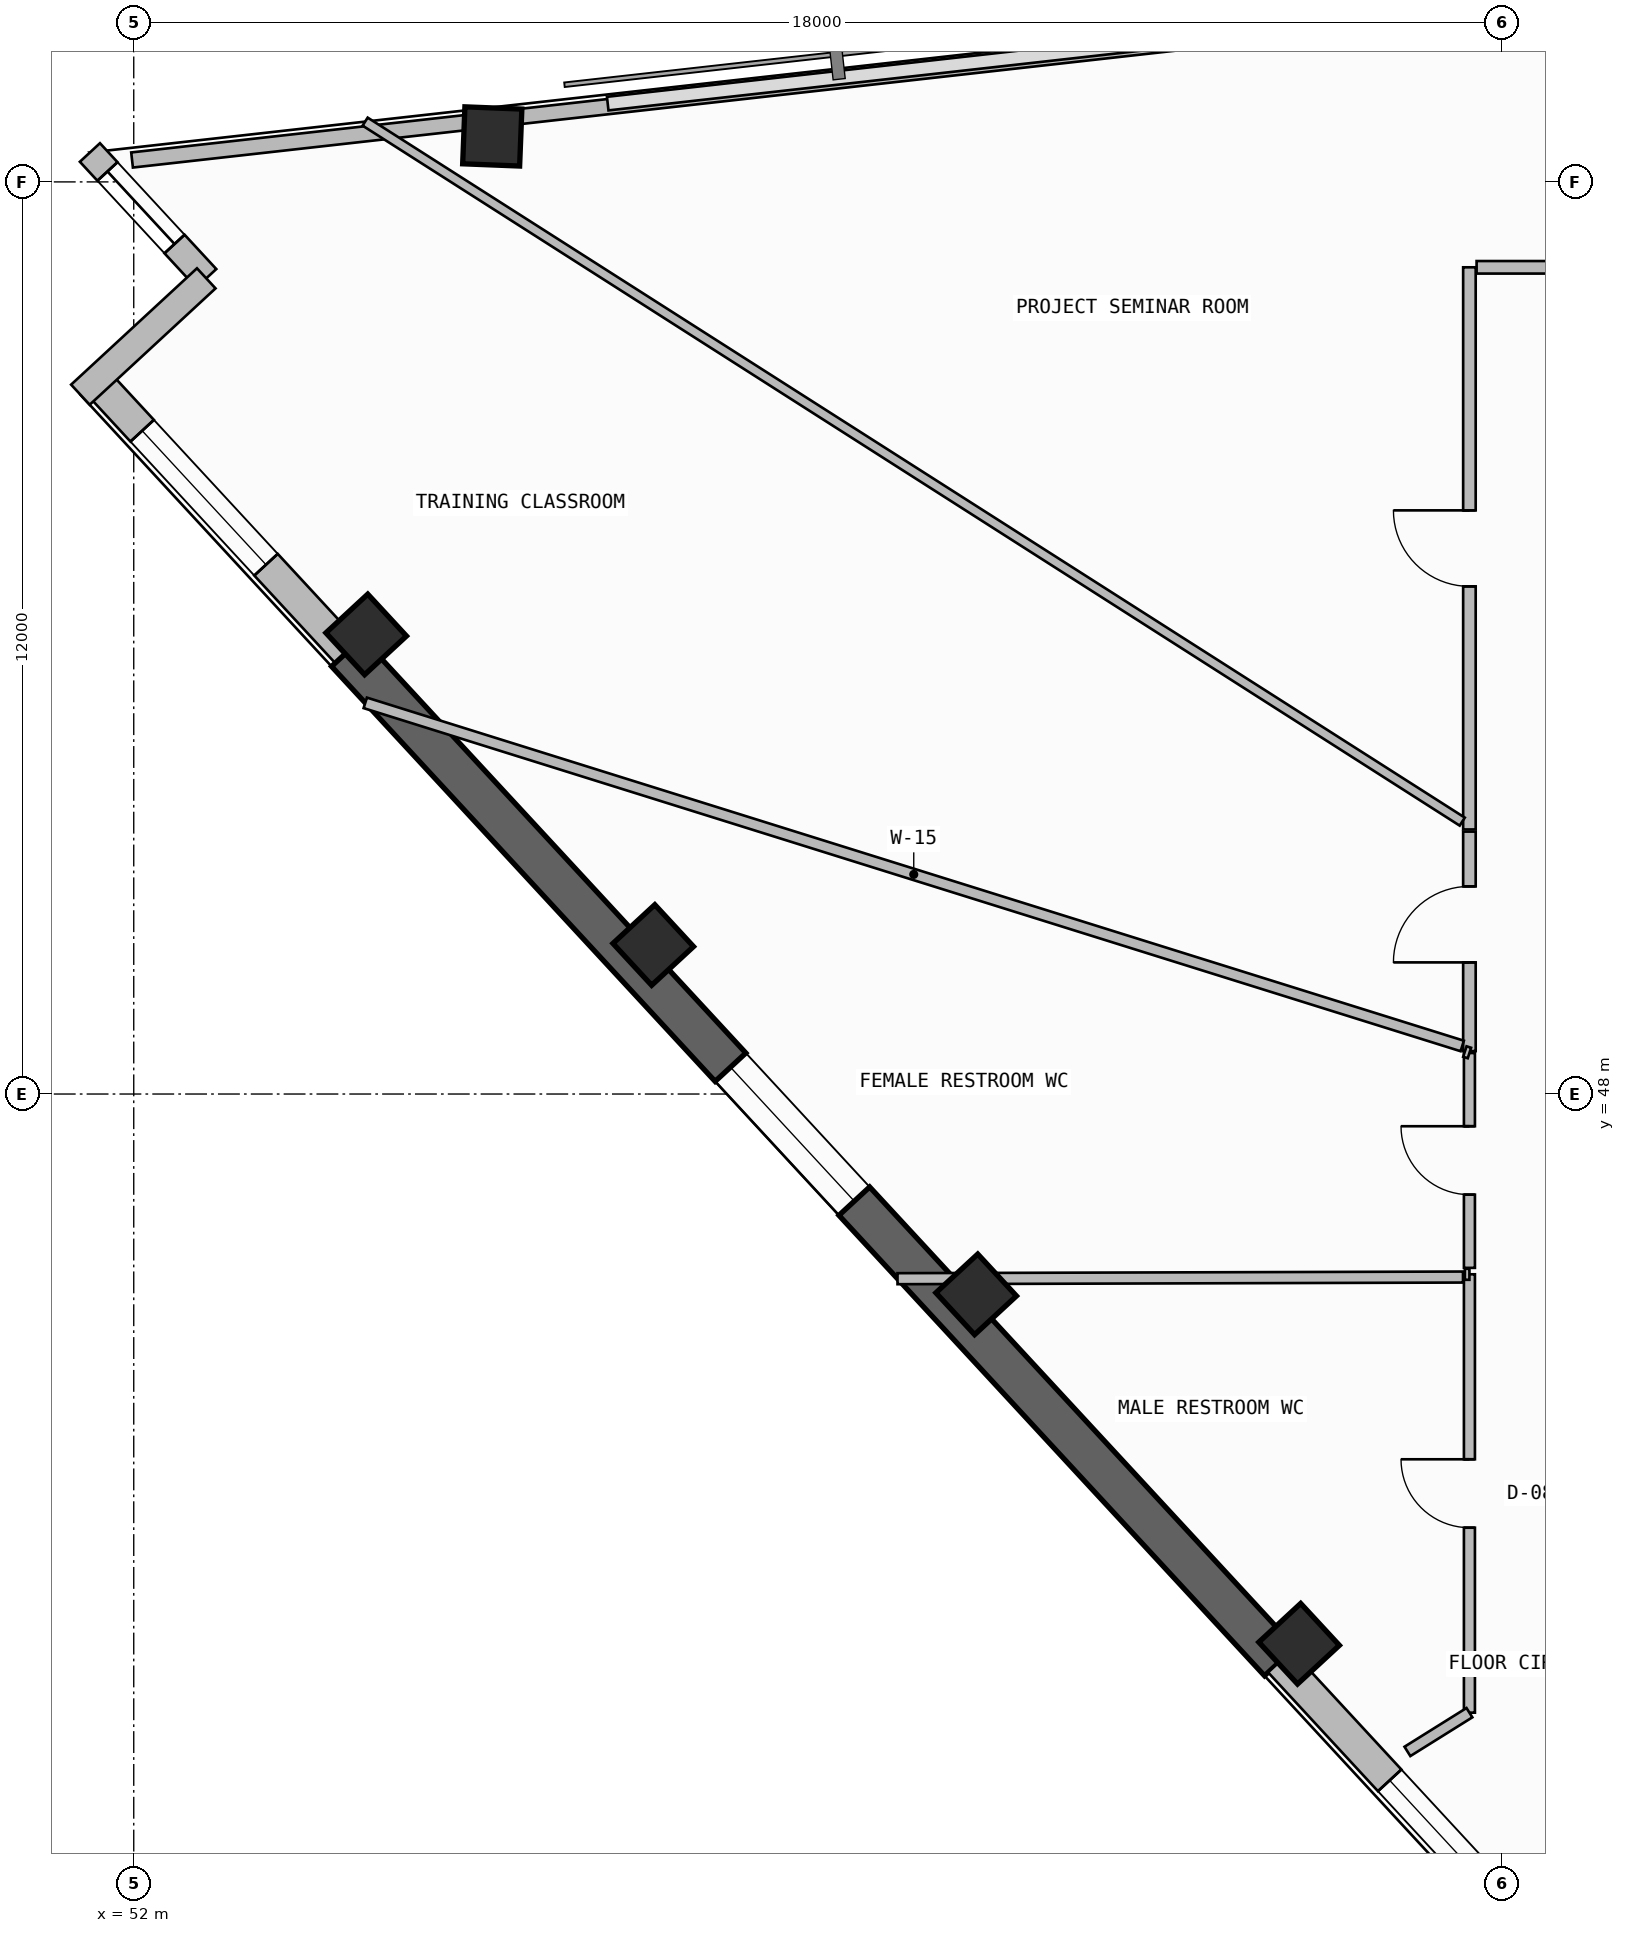
"""IFC4 building model, lengths in metres.
Left out: names, types, materials, properties, quantities, classifications, styles, units other than length and angle.
Written with IfcOpenShell. Run it as: python <this file> out.ifc"""

import sys

from ifc_helpers import new_model, si_unit, direction, frame, frame_2d, origin, origin_2d, place, context, subcontext, project, spatial, rectangle, extrude, element, fill, save


model = new_model("IFC4")
c1 = context("Model", 3, precision=1e-05, world=origin(), true_north=direction((0.0, 1.0)))
c2 = subcontext(c1, "Body", "Model", "MODEL_VIEW")
j1 = project(units=[si_unit("LENGTHUNIT", "METRE"), si_unit("PLANEANGLEUNIT", "RADIAN")], contexts=[c1])
p1 = place(None, origin())
s1 = spatial("IfcSite", under=j1, at=p1, CompositionType="ELEMENT")
p2 = place(p1, origin())
s2 = spatial("IfcBuilding", under=s1, at=p2, CompositionType="ELEMENT")
p3 = place(p2, frame((0.0, 0.0, 271.3)))
s3 = spatial("IfcBuildingStorey", under=s2, at=p3, CompositionType="ELEMENT", Elevation=271.3)
for number, where, z_axis, x_axis in (
    (1, (56.717, 60.598, 0.0), (0.0, 0.0, 1.0), (0.039, 0.999, 0.0)),
    (2, (55.058, 54.046, 0.0), (0.0, 0.0, 1.0), (-0.679, 0.734, 0.0)),
    (3, (58.835, 49.961, 0.0), (0.0, 0.0, 1.0), (-0.679, 0.734, 0.0)),
    (4, (63.084, 45.364, 0.0), (0.0, 0.0, 1.0), (-0.679, 0.734, 0.0)),
    (5, (67.333, 40.768, 0.0), (0.0, 0.0, 1.0), (-0.679, 0.734, 0.0)),
):
    element("IfcColumn", number, at=place(p3, frame(where, z_axis=z_axis, x_axis=x_axis)), inside=s3, PredefinedType="COLUMN", context=c2, shape_type="SweptSolid", body=[
        extrude(rectangle(XDim=0.75, YDim=0.75, at=origin_2d()), origin(), (0.0, 0.0, 1.0), 3.52),
    ])
p4 = place(p3, frame((51.5, 57.387, 0.0), z_axis=(0.0, 0.0, 1.0), x_axis=(0.67880684669, -0.734316869537, 0.0)))
e6 = element("IfcWall", 6, at=p4, inside=s3, PredefinedType="SOLIDWALL", context=c2, shape_type="SweptSolid", body=[
    extrude(rectangle(XDim=4.869, YDim=0.42, at=frame_2d((2.434, 0.0))), origin(), (0.0, 0.0, 1.0), 2.645),
])
p5 = place(p4, frame((0.9, 0.0, 1.1)))
e7 = element("IfcOpeningElement", 7, at=p5, cuts=e6, PredefinedType="OPENING", context=c2, shape_type="SweptSolid", body=[
    extrude(rectangle(XDim=2.4, YDim=1.2, at=frame_2d((1.2, 0.6))), frame((0.0, 0.22, 0.0), z_axis=(0.0, -1.0, 0.0), x_axis=(1.0, 0.0, 0.0)), (0.0, 0.0, 1.0), 0.44),
])
p6 = place(p3, frame((54.805, 53.812, -0.26), z_axis=(0.0, 0.0, 1.0), x_axis=(0.678803115619, -0.734320318543, 0.0)))
e8 = element("IfcWall", 8, at=p6, inside=s3, PredefinedType="SHEAR", context=c2, shape_type="SweptSolid", body=[
    extrude(rectangle(XDim=18.083, YDim=0.55, at=frame_2d((9.042, 0.0))), origin(), (0.0, 0.0, 1.0), 3.52),
])
p7 = place(p6, frame((7.434, 0.0, 1.1)))
e9 = element("IfcOpeningElement", 9, at=p7, cuts=e8, PredefinedType="OPENING", context=c2, shape_type="SweptSolid", body=[
    extrude(rectangle(XDim=2.4, YDim=1.2, at=frame_2d((1.2, 0.6))), frame((0.0, 0.285, 0.0), z_axis=(0.0, -1.0, 0.0), x_axis=(1.0, 0.0, 0.0)), (0.0, 0.0, 1.0), 0.57),
])
p8 = place(p3, frame((67.08, 40.533, 0.0), z_axis=(0.0, 0.0, 1.0), x_axis=(0.678800006437, -0.734323192648, 0.0)))
e10 = element("IfcWall", 10, at=p8, inside=s3, PredefinedType="SOLIDWALL", context=c2, shape_type="SweptSolid", body=[
    extrude(rectangle(XDim=6.512, YDim=0.42, at=frame_2d((3.256, 0.0))), origin(), (0.0, 0.0, 1.0), 2.645),
])
p9 = place(p8, frame((2.129, 0.0, 1.1)))
e11 = element("IfcOpeningElement", 11, at=p9, cuts=e10, PredefinedType="OPENING", context=c2, shape_type="SweptSolid", body=[
    extrude(rectangle(XDim=2.4, YDim=1.2, at=frame_2d((1.2, 0.6))), frame((0.0, 0.22, 0.0), z_axis=(0.0, -1.0, 0.0), x_axis=(1.0, 0.0, 0.0)), (0.0, 0.0, 1.0), 0.44),
])
p10 = place(p3, frame((51.423, 60.387, 0.0), z_axis=(0.0, 0.0, 1.0), x_axis=(0.678792531533, -0.734330102294, 0.0)))
e12 = element("IfcWall", 12, at=p10, inside=s3, PredefinedType="SOLIDWALL", context=c2, shape_type="SweptSolid", body=[
    extrude(rectangle(XDim=2.255, YDim=0.36, at=frame_2d((1.127, 0.0))), origin(), (0.0, 0.0, 1.0), 3.26),
])
p11 = place(p10, frame((0.34, 0.0, 0.45)))
e13 = element("IfcOpeningElement", 13, at=p11, cuts=e12, PredefinedType="OPENING", context=c2, shape_type="SweptSolid", body=[
    extrude(rectangle(XDim=1.3, YDim=2.4, at=frame_2d((0.65, 1.2))), frame((0.0, 0.19, 0.0), z_axis=(0.0, -1.0, 0.0), x_axis=(1.0, 0.0, 0.0)), (0.0, 0.0, 1.0), 0.38),
])
p12 = place(p3, frame((52.954, 58.731, 0.0), z_axis=(0.0, 0.0, 1.0), x_axis=(-0.734330102294, -0.678792531533, 0.0)))
e14 = element("IfcWall", 14, at=p12, inside=s3, PredefinedType="SOLIDWALL", context=c2, shape_type="SweptSolid", body=[
    extrude(rectangle(XDim=2.255, YDim=0.36, at=frame_2d((1.127, 0.0))), origin(), (0.0, 0.0, 1.0), 3.26),
])
p13 = place(p3, frame((81.557, 63.604, 0.0), z_axis=(0.0, 0.0, 1.0), x_axis=(-0.993776455024, -0.111392806945, 0.0)))
e15 = element("IfcWall", 15, at=p13, inside=s3, PredefinedType="PARAPET", context=c2, shape_type="SweptSolid", body=[
    extrude(rectangle(XDim=24.891, YDim=0.2, at=frame_2d((12.446, 0.0))), origin(), (0.0, 0.0, 1.0), 1.15),
])
p14 = place(p3, frame((56.565, 60.802, 0.0), z_axis=(0.0, 0.0, 1.0), x_axis=(-0.99377164586, -0.111435702918, 0.0)))
e16 = element("IfcWall", 16, at=p14, inside=s3, PredefinedType="PARAPET", context=c2, shape_type="SweptSolid", body=[
    extrude(rectangle(XDim=4.616, YDim=0.2, at=frame_2d((2.308, 0.0))), origin(), (0.0, 0.0, 1.0), 1.15),
])
p15 = place(p3, frame((69.573, 45.628, 0.0), z_axis=(0.0, 0.0, 1.0), x_axis=(0.0, -1.0, 0.0)))
e17 = element("IfcWall", 17, at=p15, inside=s3, PredefinedType="PARTITIONING", context=c2, shape_type="SweptSolid", body=[
    extrude(rectangle(XDim=5.767, YDim=0.145, at=frame_2d((2.884, 0.0))), origin(), (0.0, 0.0, 1.0), 3.26),
])
p16 = place(p15, frame((2.434, 0.0, 0.0)))
e18 = element("IfcOpeningElement", 18, at=p16, cuts=e17, PredefinedType="OPENING", context=c2, shape_type="SweptSolid", body=[
    extrude(rectangle(XDim=0.9, YDim=2.1, at=frame_2d((0.45, 1.05))), frame((0.0, 0.083, 0.0), z_axis=(0.0, -1.0, 0.0), x_axis=(1.0, 0.0, 0.0)), (0.0, 0.0, 1.0), 0.165),
])
p17 = place(p3, frame((69.514, 45.628, 0.0), z_axis=(0.0, 0.0, 1.0), x_axis=(1.0, 0.0, 0.0)))
e19 = element("IfcWall", 19, at=p17, inside=s3, PredefinedType="PARTITIONING", context=c2, shape_type="SweptSolid", body=[
    extrude(rectangle(XDim=0.06, YDim=0.145, at=frame_2d((0.03, 0.0))), origin(), (0.0, 0.0, 1.0), 3.26),
])
p18 = place(p3, frame((62.049, 45.571, 0.0), z_axis=(0.0, 0.0, 1.0), x_axis=(0.999995830872, 0.002887600759, 0.0)))
e20 = element("IfcWall", 20, at=p18, inside=s3, PredefinedType="PARTITIONING", context=c2, shape_type="SweptSolid", body=[
    extrude(rectangle(XDim=7.44, YDim=0.145, at=frame_2d((3.72, 0.0))), origin(), (0.0, 0.0, 1.0), 2.645),
])
p19 = place(p3, frame((69.573, 58.876, 0.0), z_axis=(0.0, 0.0, 1.0), x_axis=(0.0, -1.0, 0.0)))
e21 = element("IfcWall", 21, at=p19, inside=s3, PredefinedType="PARTITIONING", context=c2, shape_type="SweptSolid", body=[
    extrude(rectangle(XDim=7.396, YDim=0.165, at=frame_2d((3.698, 0.0))), origin(), (0.0, 0.0, 1.0), 2.745),
])
p20 = place(p19, frame((3.198, 0.0, 0.0)))
e22 = element("IfcOpeningElement", 22, at=p20, cuts=e21, PredefinedType="OPENING", context=c2, shape_type="SweptSolid", body=[
    extrude(rectangle(XDim=1.0, YDim=2.2, at=frame_2d((0.5, 1.1))), frame((0.0, 0.093, 0.0), z_axis=(0.0, -1.0, 0.0), x_axis=(1.0, 0.0, 0.0)), (0.0, 0.0, 1.0), 0.185),
])
p21 = place(p3, frame((72.497, 58.876, 0.0), z_axis=(0.0, 0.0, 1.0), x_axis=(-1.0, 0.0, 0.0)))
e23 = element("IfcWall", 23, at=p21, inside=s3, PredefinedType="PARTITIONING", context=c2, shape_type="SweptSolid", body=[
    extrude(rectangle(XDim=2.829, YDim=0.165, at=frame_2d((1.414, 0.0))), origin(), (0.0, 0.0, 1.0), 3.26),
])
p22 = place(p3, frame((69.479, 51.584, 0.0), z_axis=(0.0, 0.0, 1.0), x_axis=(-0.843040926806, 0.537849417337, 0.0)))
e24 = element("IfcWall", 24, at=p22, inside=s3, PredefinedType="PARTITIONING", context=c2, shape_type="SweptSolid", body=[
    extrude(rectangle(XDim=17.122, YDim=0.125, at=frame_2d((8.561, 0.0))), origin(), (0.0, 0.0, 1.0), 2.645),
])
p23 = place(p3, frame((69.573, 51.452, 0.0), z_axis=(0.0, 0.0, 1.0), x_axis=(0.0, -1.0, 0.0)))
e25 = element("IfcWall", 25, at=p23, inside=s3, PredefinedType="PARTITIONING", context=c2, shape_type="SweptSolid", body=[
    extrude(rectangle(XDim=2.887, YDim=0.165, at=frame_2d((1.444, 0.0))), origin(), (0.0, 0.0, 1.0), 2.745),
])
p24 = place(p23, frame((0.721, 0.0, 0.0)))
e26 = element("IfcOpeningElement", 26, at=p24, cuts=e25, PredefinedType="OPENING", context=c2, shape_type="SweptSolid", body=[
    extrude(rectangle(XDim=1.0, YDim=2.2, at=frame_2d((0.5, 1.1))), frame((0.0, 0.093, 0.0), z_axis=(0.0, -1.0, 0.0), x_axis=(1.0, 0.0, 0.0)), (0.0, 0.0, 1.0), 0.185),
])
p25 = place(p3, frame((69.479, 48.632, 0.0), z_axis=(0.0, 0.0, 1.0), x_axis=(-0.95441273418, 0.298490088336, 0.0)))
e27 = element("IfcWall", 27, at=p25, inside=s3, PredefinedType="PARTITIONING", context=c2, shape_type="SweptSolid", body=[
    extrude(rectangle(XDim=15.123, YDim=0.145, at=frame_2d((7.561, 0.0))), origin(), (0.0, 0.0, 1.0), 2.645),
])
p26 = place(p3, frame((69.573, 48.54, 0.0), z_axis=(0.0, 0.0, 1.0), x_axis=(0.0, -1.0, 0.0)))
e28 = element("IfcWall", 28, at=p26, inside=s3, PredefinedType="PARTITIONING", context=c2, shape_type="SweptSolid", body=[
    extrude(rectangle(XDim=2.827, YDim=0.145, at=frame_2d((1.414, 0.0))), origin(), (0.0, 0.0, 1.0), 3.26),
])
p27 = place(p26, frame((0.963, 0.0, 0.0)))
e29 = element("IfcOpeningElement", 29, at=p27, cuts=e28, PredefinedType="OPENING", context=c2, shape_type="SweptSolid", body=[
    extrude(rectangle(XDim=0.9, YDim=2.1, at=frame_2d((0.45, 1.05))), frame((0.0, 0.083, 0.0), z_axis=(0.0, -1.0, 0.0), x_axis=(1.0, 0.0, 0.0)), (0.0, 0.0, 1.0), 0.165),
])
p28 = place(p3, frame((69.514, 48.559, 0.0), z_axis=(0.0, 0.0, 1.0), x_axis=(0.952874687709, -0.303364186291, 0.0)))
e30 = element("IfcWall", 30, at=p28, inside=s3, PredefinedType="PARTITIONING", context=c2, shape_type="SweptSolid", body=[
    extrude(rectangle(XDim=0.063, YDim=0.145, at=frame_2d((0.031, 0.0))), origin(), (0.0, 0.0, 1.0), 3.26),
])
p29 = place(p3, frame((69.573, 39.861, 0.0), z_axis=(0.0, 0.0, 1.0), x_axis=(-0.848012563248, -0.529976124532, 0.0)))
e31 = element("IfcWall", 31, at=p29, inside=s3, PredefinedType="PARTITIONING", context=c2, shape_type="SweptSolid", body=[
    extrude(rectangle(XDim=0.962, YDim=0.145, at=frame_2d((0.481, 0.0))), origin(), (0.0, 0.0, 1.0), 3.26),
])
p30 = place(p5, origin())
e32 = element("IfcWindow", 32, at=p30, inside=s3, PartitioningType="SINGLE_PANEL", PredefinedType="WINDOW", context=c2, shape_type="SweptSolid", body=[
    extrude(rectangle(XDim=2.4, YDim=1.2, at=frame_2d((1.2, 0.6))), frame((0.0, 0.03, 0.0), z_axis=(0.0, -1.0, 0.0), x_axis=(1.0, 0.0, 0.0)), (0.0, 0.0, 1.0), 0.06),
])
fill(e7, e32)
p31 = place(p7, origin())
e33 = element("IfcWindow", 33, at=p31, inside=s3, PartitioningType="SINGLE_PANEL", PredefinedType="WINDOW", context=c2, shape_type="SweptSolid", body=[
    extrude(rectangle(XDim=2.4, YDim=1.2, at=frame_2d((1.2, 0.6))), frame((0.0, 0.03, 0.0), z_axis=(0.0, -1.0, 0.0), x_axis=(1.0, 0.0, 0.0)), (0.0, 0.0, 1.0), 0.06),
])
fill(e9, e33)
p32 = place(p9, origin())
e34 = element("IfcWindow", 34, at=p32, inside=s3, PartitioningType="SINGLE_PANEL", PredefinedType="WINDOW", context=c2, shape_type="SweptSolid", body=[
    extrude(rectangle(XDim=2.4, YDim=1.2, at=frame_2d((1.2, 0.6))), frame((0.0, 0.03, 0.0), z_axis=(0.0, -1.0, 0.0), x_axis=(1.0, 0.0, 0.0)), (0.0, 0.0, 1.0), 0.06),
])
fill(e11, e34)
p33 = place(p11, origin())
e35 = element("IfcWindow", 35, at=p33, inside=s3, PartitioningType="SINGLE_PANEL", PredefinedType="WINDOW", context=c2, shape_type="SweptSolid", body=[
    extrude(rectangle(XDim=1.3, YDim=2.4, at=frame_2d((0.65, 1.2))), frame((0.0, 0.03, 0.0), z_axis=(0.0, -1.0, 0.0), x_axis=(1.0, 0.0, 0.0)), (0.0, 0.0, 1.0), 0.06),
])
fill(e13, e35)
p34 = place(p16, frame((0.9, 0.0, 0.0), z_axis=(0.0, 0.0, 1.0), x_axis=(-1.0, 0.0, 0.0)))
e36 = element("IfcDoor", 36, at=p34, inside=s3, OperationType="SINGLE_SWING_RIGHT", PredefinedType="DOOR", context=c2, shape_type="SweptSolid", body=[
    extrude(rectangle(XDim=0.9, YDim=2.1, at=frame_2d((0.45, 1.05))), frame((0.0, 0.025, 0.0), z_axis=(0.0, -1.0, 0.0), x_axis=(1.0, 0.0, 0.0)), (0.0, 0.0, 1.0), 0.05),
])
fill(e18, e36)
p35 = place(p20, frame((1.0, 0.0, 0.0), z_axis=(0.0, 0.0, 1.0), x_axis=(-1.0, 0.0, 0.0)))
e37 = element("IfcDoor", 37, at=p35, inside=s3, OperationType="SINGLE_SWING_RIGHT", PredefinedType="DOOR", context=c2, shape_type="SweptSolid", body=[
    extrude(rectangle(XDim=1.0, YDim=2.2, at=frame_2d((0.5, 1.1))), frame((0.0, 0.025, 0.0), z_axis=(0.0, -1.0, 0.0), x_axis=(1.0, 0.0, 0.0)), (0.0, 0.0, 1.0), 0.05),
])
fill(e22, e37)
p36 = place(p24, frame((1.0, 0.0, 0.0), z_axis=(0.0, 0.0, 1.0), x_axis=(-1.0, 0.0, 0.0)))
e38 = element("IfcDoor", 38, at=p36, inside=s3, OperationType="SINGLE_SWING_LEFT", PredefinedType="DOOR", context=c2, shape_type="SweptSolid", body=[
    extrude(rectangle(XDim=1.0, YDim=2.2, at=frame_2d((0.5, 1.1))), frame((0.0, 0.025, 0.0), z_axis=(0.0, -1.0, 0.0), x_axis=(1.0, 0.0, 0.0)), (0.0, 0.0, 1.0), 0.05),
])
fill(e26, e38)
p37 = place(p27, frame((0.9, 0.0, 0.0), z_axis=(0.0, 0.0, 1.0), x_axis=(-1.0, 0.0, 0.0)))
e39 = element("IfcDoor", 39, at=p37, inside=s3, OperationType="SINGLE_SWING_RIGHT", PredefinedType="DOOR", context=c2, shape_type="SweptSolid", body=[
    extrude(rectangle(XDim=0.9, YDim=2.1, at=frame_2d((0.45, 1.05))), frame((0.0, 0.025, 0.0), z_axis=(0.0, -1.0, 0.0), x_axis=(1.0, 0.0, 0.0)), (0.0, 0.0, 1.0), 0.05),
])
fill(e29, e39)
save(model, sys.argv[1])
